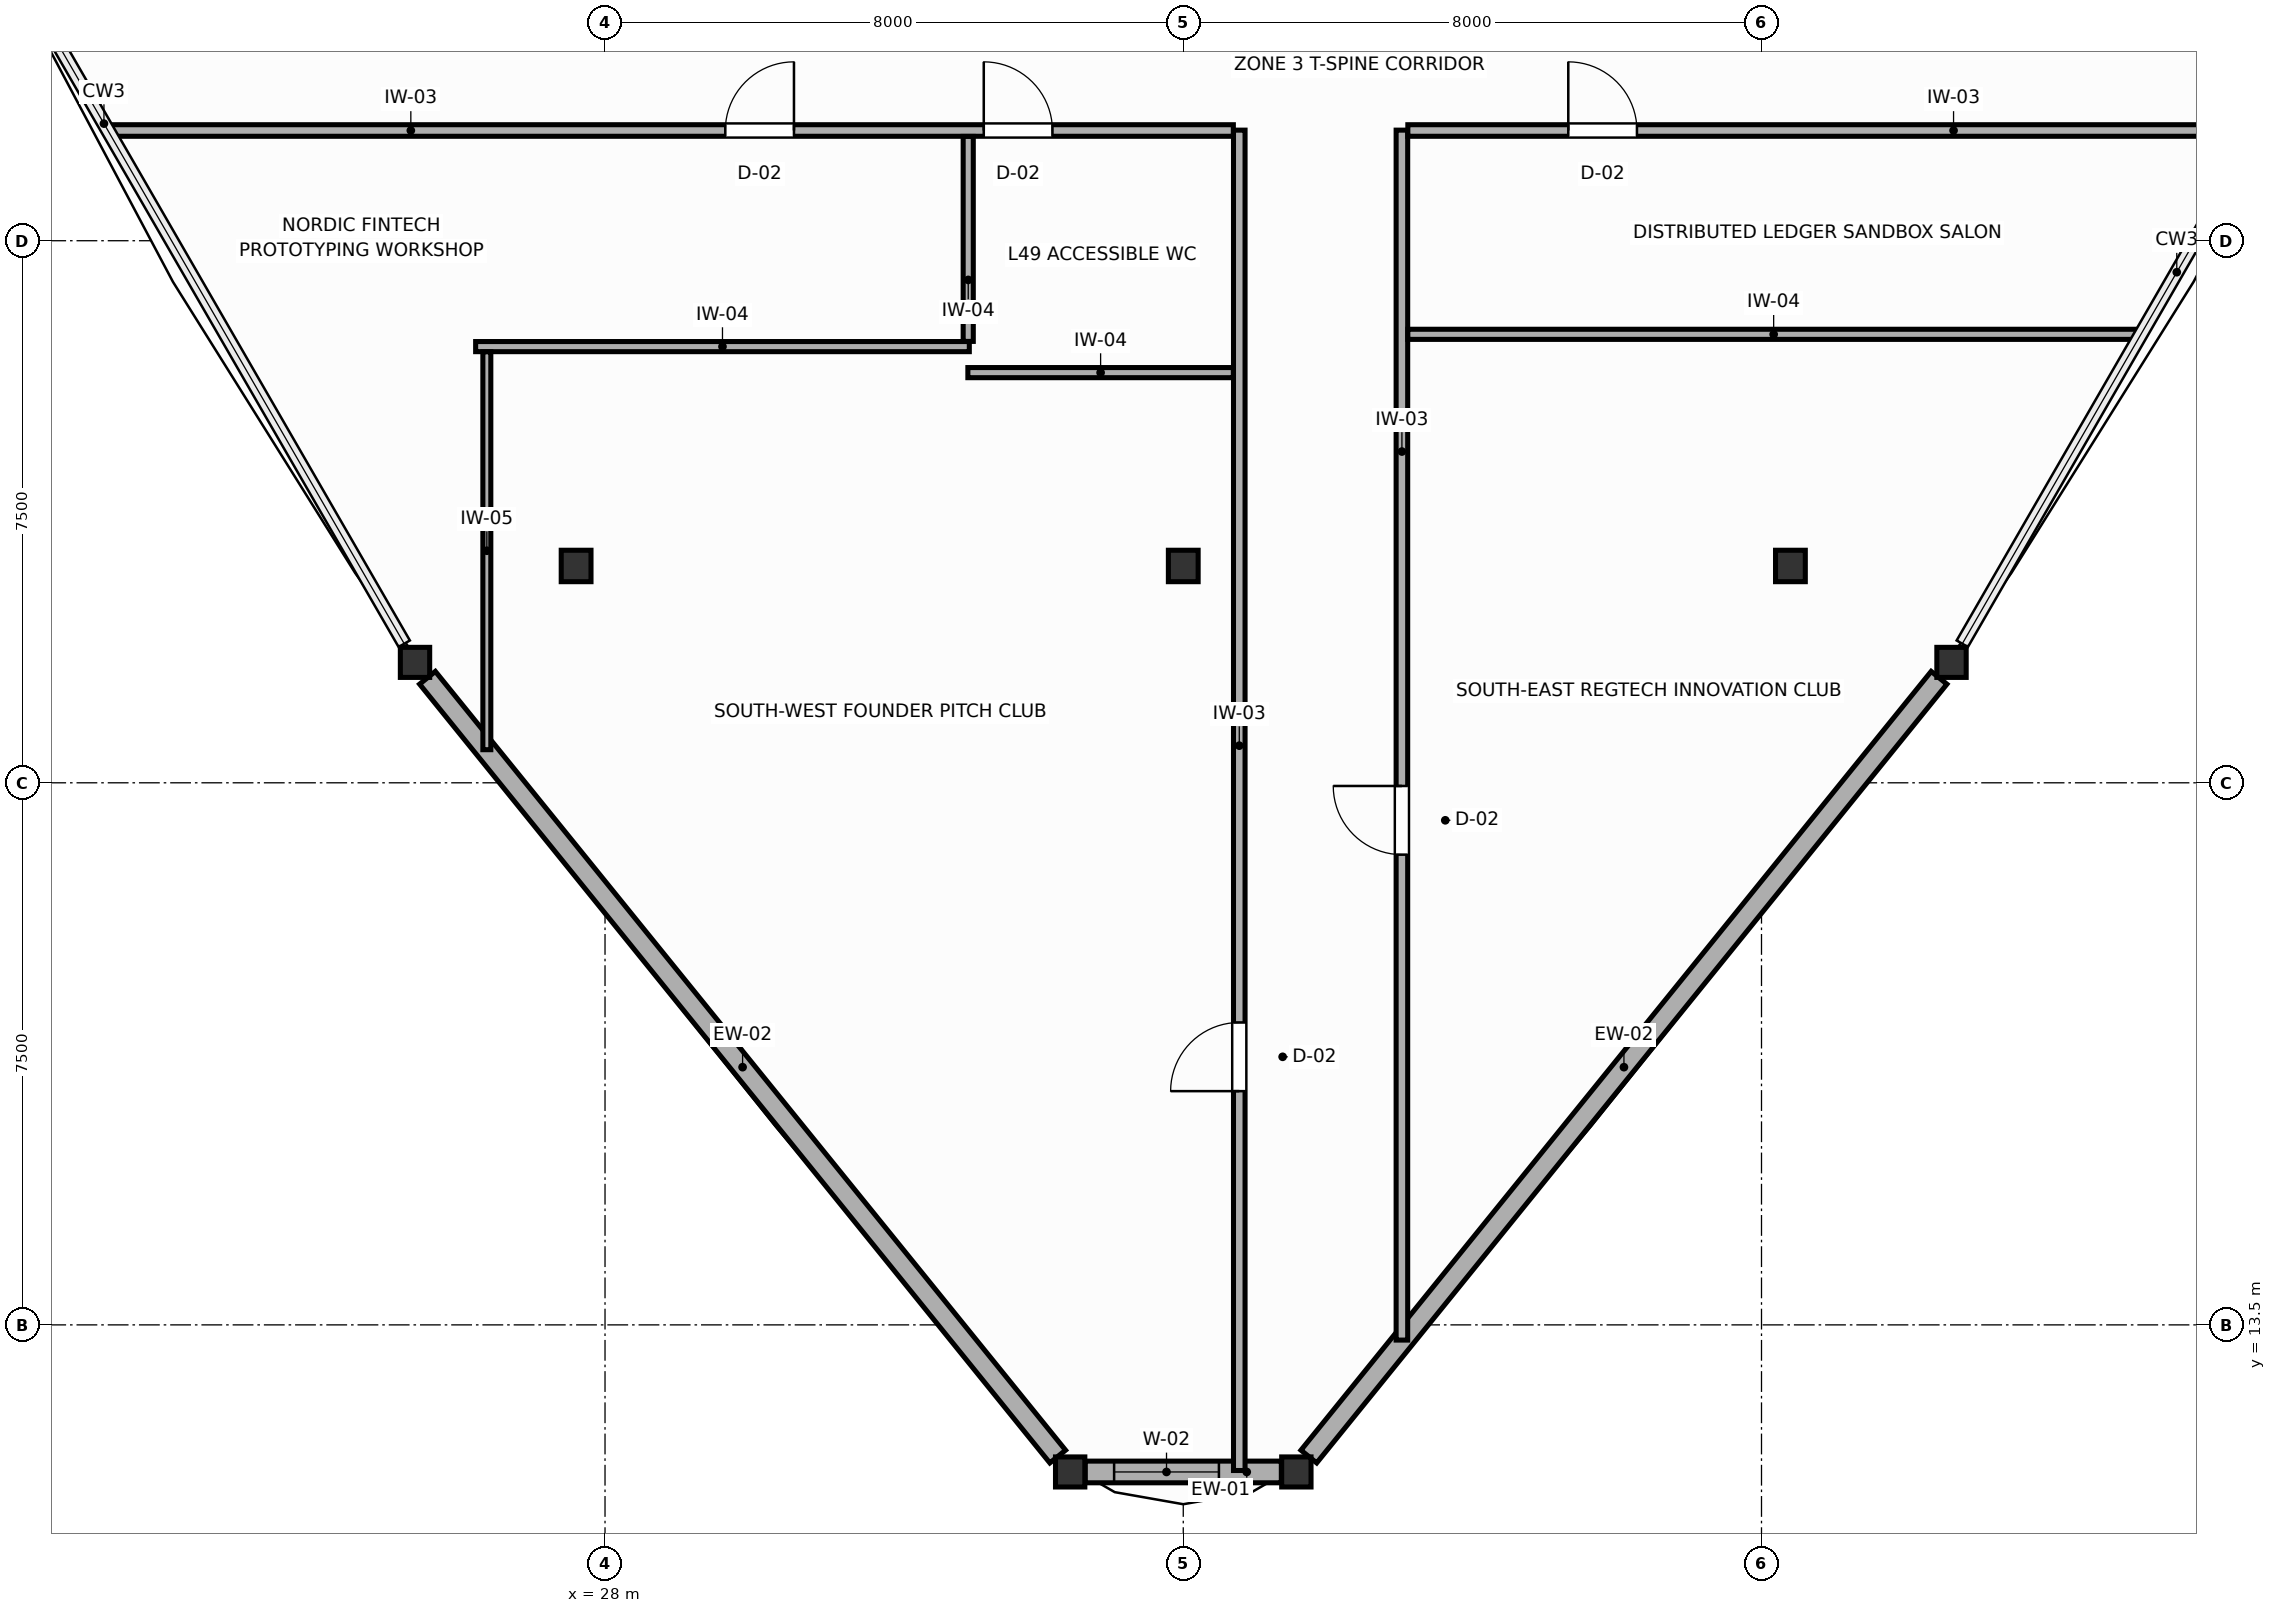
"""IFC4 building model, lengths in metres.
Left out: names, types, materials, properties, quantities, classifications, styles, units other than length and angle.
Written with IfcOpenShell. Run it as: python <this file> out.ifc"""

import sys

from ifc_helpers import new_model, si_unit, direction, frame, frame_2d, origin, origin_2d, place, context, subcontext, project, spatial, rectangle, i_section, extrude, source, transform, mapped, element, fill, save


model = new_model("IFC4")
c1 = context("Model", 3, precision=1e-05, world=origin(), true_north=direction((0.0, 1.0)))
c2 = subcontext(c1, "Body", "Model", "MODEL_VIEW")
j1 = project(units=[si_unit("LENGTHUNIT", "METRE"), si_unit("PLANEANGLEUNIT", "RADIAN")], contexts=[c1])
p1 = place(None, origin())
s1 = spatial("IfcSite", under=j1, at=p1, CompositionType="ELEMENT")
p2 = place(p1, origin())
s2 = spatial("IfcBuilding", under=s1, at=p2, CompositionType="ELEMENT")
p3 = place(p2, frame((0.0, 0.0, 190.2)))
s3 = spatial("IfcBuildingStorey", under=s2, at=p3, CompositionType="ELEMENT", Elevation=190.2)
m1 = source(origin(), c2, "Body", "SweptSolid", [
    extrude(i_section(OverallWidth=0.412, OverallDepth=0.435, WebThickness=0.033, FlangeThickness=0.053, FilletRadius=0.015, at=origin_2d()), origin(), (0.0, 0.0, 1.0), 3.6),
])
for number, where, z_axis, x_axis in (
    (1, (27.6, 24.0, 0.0), (0.0, 0.0, 1.0), (1.0, 0.0, 0.0)),
    (2, (44.4, 24.0, 0.0), (0.0, 0.0, 1.0), (1.0, 0.0, 0.0)),
    (3, (36.0, 24.0, 0.0), (0.0, 0.0, 1.0), (1.0, 0.0, 0.0)),
):
    element("IfcColumn", number, at=place(p3, frame(where, z_axis=z_axis, x_axis=x_axis)), inside=s3, PredefinedType="COLUMN", context=c2, shape_type="MappedRepresentation", body=[
        mapped(m1, transform((0.0, 0.0, 0.0), scale=1.0)),
    ])
m2 = source(origin(), c2, "Body", "SweptSolid", [
    extrude(i_section(OverallWidth=0.406, OverallDepth=0.416, WebThickness=0.027, FlangeThickness=0.044, FilletRadius=0.015, at=origin_2d()), origin(), (0.0, 0.0, 1.0), 3.6),
])
for number, where, z_axis, x_axis in (
    (4, (25.371, 22.666, 0.0), (0.0, 0.0, 1.0), (1.0, 0.0, 0.0)),
    (5, (34.435, 11.465, 0.0), (0.0, 0.0, 1.0), (1.0, 0.0, 0.0)),
    (6, (37.565, 11.465, 0.0), (0.0, 0.0, 1.0), (1.0, 0.0, 0.0)),
    (7, (46.629, 22.666, 0.0), (0.0, 0.0, 1.0), (1.0, 0.0, 0.0)),
):
    element("IfcColumn", number, at=place(p3, frame(where, z_axis=z_axis, x_axis=x_axis)), inside=s3, PredefinedType="COLUMN", context=c2, shape_type="MappedRepresentation", body=[
        mapped(m2, transform((0.0, 0.0, 0.0), scale=1.0)),
    ])
p4 = place(p3, frame((25.544, 22.453, 0.0), z_axis=(0.0, 0.0, 1.0), x_axis=(0.629045703635, -0.777368318584, 0.0)))
e8 = element("IfcWall", 8, at=p4, inside=s3, PredefinedType="SOLIDWALL", context=c2, shape_type="SweptSolid", body=[
    extrude(rectangle(XDim=13.861, YDim=0.28, at=frame_2d((6.931, 0.0))), origin(), (0.0, 0.0, 1.0), 3.01),
])
p5 = place(p3, frame((34.643, 11.465, 0.0), z_axis=(0.0, 0.0, 1.0), x_axis=(1.0, 0.0, 0.0)))
e9 = element("IfcWall", 9, at=p5, inside=s3, PredefinedType="SOLIDWALL", context=c2, shape_type="SweptSolid", body=[
    extrude(rectangle(XDim=2.713, YDim=0.3, at=frame_2d((1.357, 0.0))), origin(), (0.0, 0.0, 1.0), 3.01),
])
p6 = place(p5, frame((0.4, 0.0, 0.75)))
e10 = element("IfcOpeningElement", 10, at=p6, cuts=e9, PredefinedType="OPENING", context=c2, shape_type="SweptSolid", body=[
    extrude(rectangle(XDim=1.45, YDim=1.65, at=frame_2d((0.725, 0.825))), frame((0.0, 0.16, 0.0), z_axis=(0.0, -1.0, 0.0), x_axis=(1.0, 0.0, 0.0)), (0.0, 0.0, 1.0), 0.32),
])
p7 = place(p3, frame((37.737, 11.678, 0.0), z_axis=(0.0, 0.0, 1.0), x_axis=(0.629045703635, 0.777368318584, 0.0)))
e11 = element("IfcWall", 11, at=p7, inside=s3, PredefinedType="SOLIDWALL", context=c2, shape_type="SweptSolid", body=[
    extrude(rectangle(XDim=13.861, YDim=0.28, at=frame_2d((6.931, 0.0))), origin(), (0.0, 0.0, 1.0), 3.01),
])
p8 = place(p3, frame((36.775, 11.485, 0.0), z_axis=(0.0, 0.0, 1.0), x_axis=(0.0, 1.0, 0.0)))
e12 = element("IfcWall", 12, at=p8, inside=s3, PredefinedType="PARTITIONING", context=c2, shape_type="SweptSolid", body=[
    extrude(rectangle(XDim=18.545, YDim=0.16, at=frame_2d((9.272, 0.0))), origin(), (0.0, 0.0, 1.0), 2.95),
])
p9 = place(p8, frame((5.249, 0.0, 0.0)))
e13 = element("IfcOpeningElement", 13, at=p9, cuts=e12, PredefinedType="OPENING", context=c2, shape_type="SweptSolid", body=[
    extrude(rectangle(XDim=0.95, YDim=2.05, at=frame_2d((0.475, 1.025))), frame((0.0, 0.09, 0.0), z_axis=(0.0, -1.0, 0.0), x_axis=(1.0, 0.0, 0.0)), (0.0, 0.0, 1.0), 0.18),
])
p10 = place(p3, frame((39.025, 13.29, 0.0), z_axis=(0.0, 0.0, 1.0), x_axis=(0.0, 1.0, 0.0)))
e14 = element("IfcWall", 14, at=p10, inside=s3, PredefinedType="PARTITIONING", context=c2, shape_type="SweptSolid", body=[
    extrude(rectangle(XDim=16.74, YDim=0.16, at=frame_2d((8.37, 0.0))), origin(), (0.0, 0.0, 1.0), 3.4),
])
p11 = place(p10, frame((6.716, 0.0, 0.0)))
e15 = element("IfcOpeningElement", 15, at=p11, cuts=e14, PredefinedType="OPENING", context=c2, shape_type="SweptSolid", body=[
    extrude(rectangle(XDim=0.95, YDim=2.05, at=frame_2d((0.475, 1.025))), frame((0.0, 0.09, 0.0), z_axis=(0.0, -1.0, 0.0), x_axis=(1.0, 0.0, 0.0)), (0.0, 0.0, 1.0), 0.18),
])
p12 = place(p3, frame((21.143, 30.025, 0.0), z_axis=(0.0, 0.0, 1.0), x_axis=(1.0, 0.0, 0.0)))
e16 = element("IfcWall", 16, at=p12, inside=s3, PredefinedType="PARTITIONING", context=c2, shape_type="SweptSolid", body=[
    extrude(rectangle(XDim=15.551, YDim=0.16, at=frame_2d((7.775, 0.0))), origin(), (0.0, 0.0, 1.0), 3.4),
])
p13 = place(p12, frame((12.097, 0.0, 0.0)))
e17 = element("IfcOpeningElement", 17, at=p13, cuts=e16, PredefinedType="OPENING", context=c2, shape_type="SweptSolid", body=[
    extrude(rectangle(XDim=0.95, YDim=2.05, at=frame_2d((0.475, 1.025))), frame((0.0, 0.09, 0.0), z_axis=(0.0, -1.0, 0.0), x_axis=(1.0, 0.0, 0.0)), (0.0, 0.0, 1.0), 0.18),
])
p14 = place(p12, frame((8.521, 0.0, 0.0)))
e18 = element("IfcOpeningElement", 18, at=p14, cuts=e16, PredefinedType="OPENING", context=c2, shape_type="SweptSolid", body=[
    extrude(rectangle(XDim=0.95, YDim=2.05, at=frame_2d((0.475, 1.025))), frame((0.0, 0.09, 0.0), z_axis=(0.0, -1.0, 0.0), x_axis=(1.0, 0.0, 0.0)), (0.0, 0.0, 1.0), 0.18),
])
p15 = place(p3, frame((39.107, 30.025, 0.0), z_axis=(0.0, 0.0, 1.0), x_axis=(1.0, 0.0, 0.0)))
e19 = element("IfcWall", 19, at=p15, inside=s3, PredefinedType="PARTITIONING", context=c2, shape_type="SweptSolid", body=[
    extrude(rectangle(XDim=11.75, YDim=0.16, at=frame_2d((5.875, 0.0))), origin(), (0.0, 0.0, 1.0), 3.4),
])
p16 = place(p15, frame((2.22, 0.0, 0.0)))
e20 = element("IfcOpeningElement", 20, at=p16, cuts=e19, PredefinedType="OPENING", context=c2, shape_type="SweptSolid", body=[
    extrude(rectangle(XDim=0.95, YDim=2.05, at=frame_2d((0.475, 1.025))), frame((0.0, 0.09, 0.0), z_axis=(0.0, -1.0, 0.0), x_axis=(1.0, 0.0, 0.0)), (0.0, 0.0, 1.0), 0.18),
])
p17 = place(p3, frame((39.107, 27.205, 0.0), z_axis=(0.0, 0.0, 1.0), x_axis=(1.0, 0.0, 0.0)))
e21 = element("IfcWall", 21, at=p17, inside=s3, PredefinedType="PARTITIONING", context=c2, shape_type="SweptSolid", body=[
    extrude(rectangle(XDim=10.122, YDim=0.14, at=frame_2d((5.061, 0.0))), origin(), (0.0, 0.0, 1.0), 3.4),
])
p18 = place(p3, frame((26.21, 27.035, 0.0), z_axis=(0.0, 0.0, 1.0), x_axis=(1.0, 0.0, 0.0)))
e22 = element("IfcWall", 22, at=p18, inside=s3, PredefinedType="PARTITIONING", context=c2, shape_type="SweptSolid", body=[
    extrude(rectangle(XDim=6.83, YDim=0.14, at=frame_2d((3.415, 0.0))), origin(), (0.0, 0.0, 1.0), 3.4),
])
p19 = place(p3, frame((26.365, 21.458, 0.0), z_axis=(0.0, 0.0, 1.0), x_axis=(0.0, 1.0, 0.0)))
e23 = element("IfcWall", 23, at=p19, inside=s3, PredefinedType="MOVABLE", context=c2, shape_type="SweptSolid", body=[
    extrude(rectangle(XDim=5.505, YDim=0.11, at=frame_2d((2.752, 0.0))), origin(), (0.0, 0.0, 1.0), 3.4),
])
p20 = place(p3, frame((33.02, 26.675, 0.0), z_axis=(0.0, 0.0, 1.0), x_axis=(1.0, 0.0, 0.0)))
e24 = element("IfcWall", 24, at=p20, inside=s3, PredefinedType="PARTITIONING", context=c2, shape_type="SweptSolid", body=[
    extrude(rectangle(XDim=3.673, YDim=0.14, at=frame_2d((1.836, 0.0))), origin(), (0.0, 0.0, 1.0), 3.4),
])
p21 = place(p3, frame((33.025, 27.107, 0.0), z_axis=(0.0, 0.0, 1.0), x_axis=(0.0, 1.0, 0.0)))
e25 = element("IfcWall", 25, at=p21, inside=s3, PredefinedType="PARTITIONING", context=c2, shape_type="SweptSolid", body=[
    extrude(rectangle(XDim=2.836, YDim=0.14, at=frame_2d((1.418, 0.0))), origin(), (0.0, 0.0, 1.0), 3.4),
])
p22 = place(p6, origin())
e26 = element("IfcWindow", 26, at=p22, inside=s3, PartitioningType="SINGLE_PANEL", PredefinedType="WINDOW", context=c2, shape_type="SweptSolid", body=[
    extrude(rectangle(XDim=1.45, YDim=1.65, at=frame_2d((0.725, 0.825))), frame((0.0, 0.03, 0.0), z_axis=(0.0, -1.0, 0.0), x_axis=(1.0, 0.0, 0.0)), (0.0, 0.0, 1.0), 0.06),
])
fill(e10, e26)
p23 = place(p9, origin())
e27 = element("IfcDoor", 27, at=p23, inside=s3, OperationType="SINGLE_SWING_LEFT", PredefinedType="DOOR", context=c2, shape_type="SweptSolid", body=[
    extrude(rectangle(XDim=0.95, YDim=2.05, at=frame_2d((0.475, 1.025))), frame((0.0, 0.025, 0.0), z_axis=(0.0, -1.0, 0.0), x_axis=(1.0, 0.0, 0.0)), (0.0, 0.0, 1.0), 0.05),
])
fill(e13, e27)
p24 = place(p11, origin())
e28 = element("IfcDoor", 28, at=p24, inside=s3, OperationType="SINGLE_SWING_RIGHT", PredefinedType="DOOR", context=c2, shape_type="SweptSolid", body=[
    extrude(rectangle(XDim=0.95, YDim=2.05, at=frame_2d((0.475, 1.025))), frame((0.0, 0.025, 0.0), z_axis=(0.0, -1.0, 0.0), x_axis=(1.0, 0.0, 0.0)), (0.0, 0.0, 1.0), 0.05),
])
fill(e15, e28)
p25 = place(p13, origin())
e29 = element("IfcDoor", 29, at=p25, inside=s3, OperationType="SINGLE_SWING_LEFT", PredefinedType="DOOR", context=c2, shape_type="SweptSolid", body=[
    extrude(rectangle(XDim=0.95, YDim=2.05, at=frame_2d((0.475, 1.025))), frame((0.0, 0.025, 0.0), z_axis=(0.0, -1.0, 0.0), x_axis=(1.0, 0.0, 0.0)), (0.0, 0.0, 1.0), 0.05),
])
fill(e17, e29)
p26 = place(p14, origin())
e30 = element("IfcDoor", 30, at=p26, inside=s3, OperationType="SINGLE_SWING_RIGHT", PredefinedType="DOOR", context=c2, shape_type="SweptSolid", body=[
    extrude(rectangle(XDim=0.95, YDim=2.05, at=frame_2d((0.475, 1.025))), frame((0.0, 0.025, 0.0), z_axis=(0.0, -1.0, 0.0), x_axis=(1.0, 0.0, 0.0)), (0.0, 0.0, 1.0), 0.05),
])
fill(e18, e30)
p27 = place(p16, origin())
e31 = element("IfcDoor", 31, at=p27, inside=s3, OperationType="SINGLE_SWING_LEFT", PredefinedType="DOOR", context=c2, shape_type="SweptSolid", body=[
    extrude(rectangle(XDim=0.95, YDim=2.05, at=frame_2d((0.475, 1.025))), frame((0.0, 0.025, 0.0), z_axis=(0.0, -1.0, 0.0), x_axis=(1.0, 0.0, 0.0)), (0.0, 0.0, 1.0), 0.05),
])
fill(e20, e31)
save(model, sys.argv[1])
